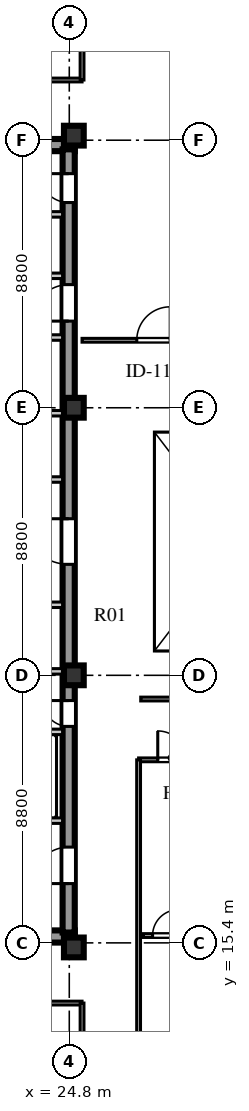
"""IFC4 building model, lengths in metres.
Left out: names, types, materials, properties, quantities, classifications, styles, units other than length and angle.
Written with IfcOpenShell. Run it as: python <this file> out.ifc"""

import sys

from ifc_helpers import new_model, si_unit, direction, frame, frame_2d, origin, origin_2d, place, context, subcontext, project, spatial, rectangle, extrude, element, fill, save


model = new_model("IFC4")
c1 = context("Model", 3, precision=1e-05, world=origin(), true_north=direction((0.0, 1.0)))
c2 = subcontext(c1, "Body", "Model", "MODEL_VIEW")
j1 = project(units=[si_unit("LENGTHUNIT", "METRE"), si_unit("PLANEANGLEUNIT", "RADIAN")], contexts=[c1])
p1 = place(None, origin())
s1 = spatial("IfcSite", under=j1, at=p1, CompositionType="ELEMENT")
p2 = place(p1, origin())
s2 = spatial("IfcBuilding", under=s1, at=p2, CompositionType="ELEMENT")
p3 = place(p2, frame((0.0, 0.0, 280.4)))
s3 = spatial("IfcBuildingStorey", under=s2, at=p3, CompositionType="ELEMENT", Elevation=280.4)
for number, where, z_axis, x_axis in (
    (1, (15.5, 15.61, 0.0), (0.0, 0.0, 1.0), (1.0, 0.0, 0.0)),
    (2, (15.5, 41.64, 0.0), (0.0, 0.0, 1.0), (1.0, 0.0, 0.0)),
):
    element("IfcWall", number, at=place(p3, frame(where, z_axis=z_axis, x_axis=x_axis)), inside=s3, PredefinedType="SHEAR", context=c2, shape_type="SweptSolid", body=[
        extrude(rectangle(XDim=9.48, YDim=0.4, at=frame_2d((4.74, 0.0))), origin(), (0.0, 0.0, 1.0), 3.66),
    ])
p4 = place(p3, frame((24.78, 15.74, 0.0), z_axis=(0.0, 0.0, 1.0), x_axis=(0.0, 1.0, 0.0)))
e3 = element("IfcWall", 3, at=p4, inside=s3, PredefinedType="SHEAR", context=c2, shape_type="SweptSolid", body=[
    extrude(rectangle(XDim=25.76, YDim=0.4, at=frame_2d((12.88, 0.0))), origin(), (0.0, 0.0, 1.0), 3.66),
])
p5 = place(p4, frame((1.61, 0.0, 0.0)))
e4 = element("IfcOpeningElement", 4, at=p5, cuts=e3, PredefinedType="OPENING", context=c2, shape_type="SweptSolid", body=[
    extrude(rectangle(XDim=1.2, YDim=2.1, at=frame_2d((0.6, 1.05))), frame((0.0, 0.21, 0.0), z_axis=(0.0, -1.0, 0.0), x_axis=(1.0, 0.0, 0.0)), (0.0, 0.0, 1.0), 0.42),
])
p6 = place(p4, frame((6.78, 0.0, 0.0)))
e5 = element("IfcOpeningElement", 5, at=p6, cuts=e3, PredefinedType="OPENING", context=c2, shape_type="SweptSolid", body=[
    extrude(rectangle(XDim=0.85, YDim=2.06, at=frame_2d((0.425, 1.03))), frame((0.0, 0.21, 0.0), z_axis=(0.0, -1.0, 0.0), x_axis=(1.0, 0.0, 0.0)), (0.0, 0.0, 1.0), 0.42),
])
p7 = place(p4, frame((12.11, 0.0, 0.0)))
e6 = element("IfcOpeningElement", 6, at=p7, cuts=e3, PredefinedType="OPENING", context=c2, shape_type="SweptSolid", body=[
    extrude(rectangle(XDim=1.5, YDim=2.12, at=frame_2d((0.75, 1.06))), frame((0.0, 0.21, 0.0), z_axis=(0.0, -1.0, 0.0), x_axis=(1.0, 0.0, 0.0)), (0.0, 0.0, 1.0), 0.42),
])
p8 = place(p4, frame((20.11, 0.0, 0.0)))
e7 = element("IfcOpeningElement", 7, at=p8, cuts=e3, PredefinedType="OPENING", context=c2, shape_type="SweptSolid", body=[
    extrude(rectangle(XDim=1.2, YDim=2.12, at=frame_2d((0.6, 1.06))), frame((0.0, 0.21, 0.0), z_axis=(0.0, -1.0, 0.0), x_axis=(1.0, 0.0, 0.0)), (0.0, 0.0, 1.0), 0.42),
])
p9 = place(p4, frame((24.01, 0.0, 0.0)))
e8 = element("IfcOpeningElement", 8, at=p9, cuts=e3, PredefinedType="OPENING", context=c2, shape_type="SweptSolid", body=[
    extrude(rectangle(XDim=0.95, YDim=2.1, at=frame_2d((0.475, 1.05))), frame((0.0, 0.21, 0.0), z_axis=(0.0, -1.0, 0.0), x_axis=(1.0, 0.0, 0.0)), (0.0, 0.0, 1.0), 0.42),
])
for number, where, z_axis, x_axis in (
    (9, (24.95, 15.25, 0.0), (0.0, 0.0, 1.0), (1.0, 0.0, 0.0)),
    (10, (24.95, 24.2, 0.0), (0.0, 0.0, 1.0), (1.0, 0.0, 0.0)),
    (11, (24.95, 33.0, 0.0), (0.0, 0.0, 1.0), (1.0, 0.0, 0.0)),
    (12, (24.95, 41.95, 0.0), (0.0, 0.0, 1.0), (1.0, 0.0, 0.0)),
):
    element("IfcColumn", number, at=place(p3, frame(where, z_axis=z_axis, x_axis=x_axis)), inside=s3, PredefinedType="COLUMN", context=c2, shape_type="SweptSolid", body=[
        extrude(rectangle(XDim=0.65, YDim=0.65, at=origin_2d()), origin(), (0.0, 0.0, 1.0), 3.66),
    ])
p10 = place(p3, frame((19.64, 19.42, 0.0), z_axis=(0.0, 0.0, 1.0), x_axis=(1.0, 0.0, 0.0)))
e13 = element("IfcWall", 13, at=p10, inside=s3, PredefinedType="SOLIDWALL", context=c2, shape_type="SweptSolid", body=[
    extrude(rectangle(XDim=4.94, YDim=0.18, at=frame_2d((2.47, 0.0))), origin(), (0.0, 0.0, 1.0), 3.66),
])
p11 = place(p10, frame((0.72, 0.0, 0.0)))
e14 = element("IfcOpeningElement", 14, at=p11, cuts=e13, PredefinedType="OPENING", context=c2, shape_type="SweptSolid", body=[
    extrude(rectangle(XDim=1.1, YDim=2.1, at=frame_2d((0.55, 1.05))), frame((0.0, 0.1, 0.0), z_axis=(0.0, -1.0, 0.0), x_axis=(1.0, 0.0, 0.0)), (0.0, 0.0, 1.0), 0.2),
])
p12 = place(p10, frame((3.02, 0.0, 0.0)))
e15 = element("IfcOpeningElement", 15, at=p12, cuts=e13, PredefinedType="OPENING", context=c2, shape_type="SweptSolid", body=[
    extrude(rectangle(XDim=1.1, YDim=2.1, at=frame_2d((0.55, 1.05))), frame((0.0, 0.1, 0.0), z_axis=(0.0, -1.0, 0.0), x_axis=(1.0, 0.0, 0.0)), (0.0, 0.0, 1.0), 0.2),
])
p13 = place(p3, frame((19.64, 22.34, 0.0), z_axis=(0.0, 0.0, 1.0), x_axis=(1.0, 0.0, 0.0)))
e16 = element("IfcWall", 16, at=p13, inside=s3, PredefinedType="SOLIDWALL", context=c2, shape_type="SweptSolid", body=[
    extrude(rectangle(XDim=4.94, YDim=0.18, at=frame_2d((2.47, 0.0))), origin(), (0.0, 0.0, 1.0), 3.66),
])
p14 = place(p3, frame((15.9, 26.52, 0.0), z_axis=(0.0, 0.0, 1.0), x_axis=(1.0, 0.0, 0.0)))
e17 = element("IfcWall", 17, at=p14, inside=s3, PredefinedType="SOLIDWALL", context=c2, shape_type="SweptSolid", body=[
    extrude(rectangle(XDim=8.68, YDim=0.18, at=frame_2d((4.34, 0.0))), origin(), (0.0, 0.0, 1.0), 3.66),
])
p15 = place(p14, frame((3.3, 0.0, 0.0)))
e18 = element("IfcOpeningElement", 18, at=p15, cuts=e17, PredefinedType="OPENING", context=c2, shape_type="SweptSolid", body=[
    extrude(rectangle(XDim=0.95, YDim=2.1, at=frame_2d((0.475, 1.05))), frame((0.0, 0.1, 0.0), z_axis=(0.0, -1.0, 0.0), x_axis=(1.0, 0.0, 0.0)), (0.0, 0.0, 1.0), 0.2),
])
p16 = place(p3, frame((15.9, 24.33, 0.0), z_axis=(0.0, 0.0, 1.0), x_axis=(1.0, 0.0, 0.0)))
e19 = element("IfcWall", 19, at=p16, inside=s3, PredefinedType="SOLIDWALL", context=c2, shape_type="SweptSolid", body=[
    extrude(rectangle(XDim=8.68, YDim=0.18, at=frame_2d((4.34, 0.0))), origin(), (0.0, 0.0, 1.0), 3.06),
])
p17 = place(p3, frame((15.9, 30.64, 0.0), z_axis=(0.0, 0.0, 1.0), x_axis=(1.0, 0.0, 0.0)))
e20 = element("IfcWall", 20, at=p17, inside=s3, PredefinedType="SOLIDWALL", context=c2, shape_type="SweptSolid", body=[
    extrude(rectangle(XDim=8.68, YDim=0.18, at=frame_2d((4.34, 0.0))), origin(), (0.0, 0.0, 1.0), 3.66),
])
p18 = place(p17, frame((3.7, 0.0, 0.0)))
e21 = element("IfcOpeningElement", 21, at=p18, cuts=e20, PredefinedType="OPENING", context=c2, shape_type="SweptSolid", body=[
    extrude(rectangle(XDim=0.95, YDim=2.1, at=frame_2d((0.475, 1.05))), frame((0.0, 0.1, 0.0), z_axis=(0.0, -1.0, 0.0), x_axis=(1.0, 0.0, 0.0)), (0.0, 0.0, 1.0), 0.2),
])
p19 = place(p3, frame((15.9, 32.82, 0.0), z_axis=(0.0, 0.0, 1.0), x_axis=(1.0, 0.0, 0.0)))
e22 = element("IfcWall", 22, at=p19, inside=s3, PredefinedType="SOLIDWALL", context=c2, shape_type="SweptSolid", body=[
    extrude(rectangle(XDim=8.68, YDim=0.18, at=frame_2d((4.34, 0.0))), origin(), (0.0, 0.0, 1.0), 3.06),
])
p20 = place(p3, frame((22.02, 35.31, 0.0), z_axis=(0.0, 0.0, 1.0), x_axis=(1.0, 0.0, 0.0)))
e23 = element("IfcWall", 23, at=p20, inside=s3, PredefinedType="SOLIDWALL", context=c2, shape_type="SweptSolid", body=[
    extrude(rectangle(XDim=2.56, YDim=0.18, at=frame_2d((1.28, 0.0))), origin(), (0.0, 0.0, 1.0), 3.66),
])
p21 = place(p20, frame((0.55, 0.0, 0.0)))
e24 = element("IfcOpeningElement", 24, at=p21, cuts=e23, PredefinedType="OPENING", context=c2, shape_type="SweptSolid", body=[
    extrude(rectangle(XDim=1.0, YDim=2.1, at=frame_2d((0.5, 1.05))), frame((0.0, 0.1, 0.0), z_axis=(0.0, -1.0, 0.0), x_axis=(1.0, 0.0, 0.0)), (0.0, 0.0, 1.0), 0.2),
])
p22 = place(p3, frame((19.64, 37.34, 0.0), z_axis=(0.0, 0.0, 1.0), x_axis=(1.0, 0.0, 0.0)))
e25 = element("IfcWall", 25, at=p22, inside=s3, PredefinedType="SOLIDWALL", context=c2, shape_type="SweptSolid", body=[
    extrude(rectangle(XDim=4.94, YDim=0.18, at=frame_2d((2.47, 0.0))), origin(), (0.0, 0.0, 1.0), 3.66),
])
p23 = place(p22, frame((0.45, 0.0, 0.0)))
e26 = element("IfcOpeningElement", 26, at=p23, cuts=e25, PredefinedType="OPENING", context=c2, shape_type="SweptSolid", body=[
    extrude(rectangle(XDim=1.0, YDim=2.1, at=frame_2d((0.5, 1.05))), frame((0.0, 0.1, 0.0), z_axis=(0.0, -1.0, 0.0), x_axis=(1.0, 0.0, 0.0)), (0.0, 0.0, 1.0), 0.2),
])
p24 = place(p22, frame((2.5, 0.0, 0.0)))
e27 = element("IfcOpeningElement", 27, at=p24, cuts=e25, PredefinedType="OPENING", context=c2, shape_type="SweptSolid", body=[
    extrude(rectangle(XDim=1.0, YDim=2.1, at=frame_2d((0.5, 1.05))), frame((0.0, 0.1, 0.0), z_axis=(0.0, -1.0, 0.0), x_axis=(1.0, 0.0, 0.0)), (0.0, 0.0, 1.0), 0.2),
])
p25 = place(p3, frame((19.64, 39.36, 0.0), z_axis=(0.0, 0.0, 1.0), x_axis=(1.0, 0.0, 0.0)))
e28 = element("IfcWall", 28, at=p25, inside=s3, PredefinedType="SOLIDWALL", context=c2, shape_type="SweptSolid", body=[
    extrude(rectangle(XDim=4.94, YDim=0.18, at=frame_2d((2.47, 0.0))), origin(), (0.0, 0.0, 1.0), 3.66),
])
p26 = place(p3, frame((27.08, 21.42, 0.0), z_axis=(0.0, 0.0, 1.0), x_axis=(1.0, 0.0, 0.0)))
e29 = element("IfcWall", 29, at=p26, inside=s3, PredefinedType="PLUMBINGWALL", context=c2, shape_type="SweptSolid", body=[
    extrude(rectangle(XDim=12.07, YDim=0.125, at=frame_2d((6.035, 0.0))), origin(), (0.0, 0.0, 1.0), 3.36),
])
p27 = place(p26, frame((0.63, 0.0, 0.0)))
e30 = element("IfcOpeningElement", 30, at=p27, cuts=e29, PredefinedType="OPENING", context=c2, shape_type="SweptSolid", body=[
    extrude(rectangle(XDim=0.95, YDim=2.1, at=frame_2d((0.475, 1.05))), frame((0.0, 0.073, 0.0), z_axis=(0.0, -1.0, 0.0), x_axis=(1.0, 0.0, 0.0)), (0.0, 0.0, 1.0), 0.145),
])
p28 = place(p3, frame((27.08, 10.38, 0.0), z_axis=(0.0, 0.0, 1.0), x_axis=(0.0, 1.0, 0.0)))
e31 = element("IfcWall", 31, at=p28, inside=s3, PredefinedType="PLUMBINGWALL", context=c2, shape_type="SweptSolid", body=[
    extrude(rectangle(XDim=11.04, YDim=0.125, at=frame_2d((5.52, 0.0))), origin(), (0.0, 0.0, 1.0), 3.66),
])
p29 = place(p3, frame((27.15, 23.42, 0.0), z_axis=(0.0, 0.0, 1.0), x_axis=(1.0, 0.0, 0.0)))
e32 = element("IfcWall", 32, at=p29, inside=s3, PredefinedType="PLUMBINGWALL", context=c2, shape_type="SweptSolid", body=[
    extrude(rectangle(XDim=6.0, YDim=0.125, at=frame_2d((3.0, 0.0))), origin(), (0.0, 0.0, 1.0), 3.66),
])
p30 = place(p3, frame((25.22, 35.22, 0.0), z_axis=(0.0, 0.0, 1.0), x_axis=(1.0, 0.0, 0.0)))
e33 = element("IfcWall", 33, at=p30, inside=s3, PredefinedType="PLUMBINGWALL", context=c2, shape_type="SweptSolid", body=[
    extrude(rectangle(XDim=9.5, YDim=0.125, at=frame_2d((4.75, 0.0))), origin(), (0.0, 0.0, 1.0), 3.66),
])
p31 = place(p30, frame((1.8, 0.0, 0.0)))
e34 = element("IfcOpeningElement", 34, at=p31, cuts=e33, PredefinedType="OPENING", context=c2, shape_type="SweptSolid", body=[
    extrude(rectangle(XDim=1.1, YDim=2.08, at=frame_2d((0.55, 1.04))), frame((0.0, 0.073, 0.0), z_axis=(0.0, -1.0, 0.0), x_axis=(1.0, 0.0, 0.0)), (0.0, 0.0, 1.0), 0.145),
])
p32 = place(p3, frame((13.8, 13.42, 0.0), z_axis=(0.0, 0.0, 1.0), x_axis=(1.0, 0.0, 0.0)))
e35 = element("IfcWall", 35, at=p32, inside=s3, PredefinedType="PLUMBINGWALL", context=c2, shape_type="SweptSolid", body=[
    extrude(rectangle(XDim=11.42, YDim=0.125, at=frame_2d((5.71, 0.0))), origin(), (0.0, 0.0, 1.0), 3.66),
])
p33 = place(p32, frame((3.2, 0.0, 0.0)))
e36 = element("IfcOpeningElement", 36, at=p33, cuts=e35, PredefinedType="OPENING", context=c2, shape_type="SweptSolid", body=[
    extrude(rectangle(XDim=0.95, YDim=2.08, at=frame_2d((0.475, 1.04))), frame((0.0, 0.073, 0.0), z_axis=(0.0, -1.0, 0.0), x_axis=(1.0, 0.0, 0.0)), (0.0, 0.0, 1.0), 0.145),
])
p34 = place(p3, frame((25.22, 10.38, 0.0), z_axis=(0.0, 0.0, 1.0), x_axis=(0.0, 1.0, 0.0)))
e37 = element("IfcWall", 37, at=p34, inside=s3, PredefinedType="PLUMBINGWALL", context=c2, shape_type="SweptSolid", body=[
    extrude(rectangle(XDim=3.04, YDim=0.125, at=frame_2d((1.52, 0.0))), origin(), (0.0, 0.0, 1.0), 3.21),
])
p35 = place(p3, frame((13.8, 43.78, 0.0), z_axis=(0.0, 0.0, 1.0), x_axis=(1.0, 0.0, 0.0)))
e38 = element("IfcWall", 38, at=p35, inside=s3, PredefinedType="PLUMBINGWALL", context=c2, shape_type="SweptSolid", body=[
    extrude(rectangle(XDim=11.42, YDim=0.125, at=frame_2d((5.71, 0.0))), origin(), (0.0, 0.0, 1.0), 3.66),
])
p36 = place(p35, frame((3.2, 0.0, 0.0)))
e39 = element("IfcOpeningElement", 39, at=p36, cuts=e38, PredefinedType="OPENING", context=c2, shape_type="SweptSolid", body=[
    extrude(rectangle(XDim=0.95, YDim=2.08, at=frame_2d((0.475, 1.04))), frame((0.0, 0.073, 0.0), z_axis=(0.0, -1.0, 0.0), x_axis=(1.0, 0.0, 0.0)), (0.0, 0.0, 1.0), 0.145),
])
p37 = place(p3, frame((25.22, 43.78, 0.0), z_axis=(0.0, 0.0, 1.0), x_axis=(0.0, 1.0, 0.0)))
e40 = element("IfcWall", 40, at=p37, inside=s3, PredefinedType="PLUMBINGWALL", context=c2, shape_type="SweptSolid", body=[
    extrude(rectangle(XDim=3.04, YDim=0.125, at=frame_2d((1.52, 0.0))), origin(), (0.0, 0.0, 1.0), 3.21),
])
p38 = place(p3, frame((27.24, 15.641, 0.0), z_axis=(0.0, 0.0, 1.0), x_axis=(1.0, 0.0, 0.0)))
e41 = element("IfcWall", 41, at=p38, inside=s3, PredefinedType="PLUMBINGWALL", context=c2, shape_type="SweptSolid", body=[
    extrude(rectangle(XDim=11.83, YDim=0.125, at=frame_2d((5.915, 0.0))), origin(), (0.0, 0.0, 1.0), 3.66),
])
p39 = place(p38, frame((0.3, 0.0, 0.0)))
e42 = element("IfcOpeningElement", 42, at=p39, cuts=e41, PredefinedType="OPENING", context=c2, shape_type="SweptSolid", body=[
    extrude(rectangle(XDim=0.85, YDim=2.08, at=frame_2d((0.425, 1.04))), frame((0.0, 0.073, 0.0), z_axis=(0.0, -1.0, 0.0), x_axis=(1.0, 0.0, 0.0)), (0.0, 0.0, 1.0), 0.145),
])
p40 = place(p38, frame((4.475, 0.0, 0.0)))
e43 = element("IfcOpeningElement", 43, at=p40, cuts=e41, PredefinedType="OPENING", context=c2, shape_type="SweptSolid", body=[
    extrude(rectangle(XDim=0.85, YDim=2.08, at=frame_2d((0.425, 1.04))), frame((0.0, 0.073, 0.0), z_axis=(0.0, -1.0, 0.0), x_axis=(1.0, 0.0, 0.0)), (0.0, 0.0, 1.0), 0.145),
])
p41 = place(p5, frame((1.2, 0.0, 0.0), z_axis=(0.0, 0.0, 1.0), x_axis=(-1.0, 0.0, 0.0)))
e44 = element("IfcDoor", 44, at=p41, inside=s3, OperationType="SINGLE_SWING_RIGHT", PredefinedType="DOOR", context=c2, shape_type="SweptSolid", body=[
    extrude(rectangle(XDim=1.2, YDim=2.1, at=frame_2d((0.6, 1.05))), frame((0.0, 0.025, 0.0), z_axis=(0.0, -1.0, 0.0), x_axis=(1.0, 0.0, 0.0)), (0.0, 0.0, 1.0), 0.05),
])
fill(e4, e44)
p42 = place(p6, frame((0.85, 0.0, 0.0), z_axis=(0.0, 0.0, 1.0), x_axis=(-1.0, 0.0, 0.0)))
e45 = element("IfcDoor", 45, at=p42, inside=s3, OperationType="SINGLE_SWING_LEFT", PredefinedType="DOOR", context=c2, shape_type="SweptSolid", body=[
    extrude(rectangle(XDim=0.85, YDim=2.06, at=frame_2d((0.425, 1.03))), frame((0.0, 0.025, 0.0), z_axis=(0.0, -1.0, 0.0), x_axis=(1.0, 0.0, 0.0)), (0.0, 0.0, 1.0), 0.05),
])
fill(e5, e45)
p43 = place(p7, frame((1.5, 0.0, 0.0), z_axis=(0.0, 0.0, 1.0), x_axis=(-1.0, 0.0, 0.0)))
e46 = element("IfcDoor", 46, at=p43, inside=s3, OperationType="SINGLE_SWING_LEFT", PredefinedType="DOOR", context=c2, shape_type="SweptSolid", body=[
    extrude(rectangle(XDim=1.5, YDim=2.12, at=frame_2d((0.75, 1.06))), frame((0.0, 0.025, 0.0), z_axis=(0.0, -1.0, 0.0), x_axis=(1.0, 0.0, 0.0)), (0.0, 0.0, 1.0), 0.05),
])
fill(e6, e46)
p44 = place(p8, frame((1.2, 0.0, 0.0), z_axis=(0.0, 0.0, 1.0), x_axis=(-1.0, 0.0, 0.0)))
e47 = element("IfcDoor", 47, at=p44, inside=s3, OperationType="SINGLE_SWING_RIGHT", PredefinedType="DOOR", context=c2, shape_type="SweptSolid", body=[
    extrude(rectangle(XDim=1.2, YDim=2.12, at=frame_2d((0.6, 1.06))), frame((0.0, 0.025, 0.0), z_axis=(0.0, -1.0, 0.0), x_axis=(1.0, 0.0, 0.0)), (0.0, 0.0, 1.0), 0.05),
])
fill(e7, e47)
p45 = place(p9, frame((0.95, 0.0, 0.0), z_axis=(0.0, 0.0, 1.0), x_axis=(-1.0, 0.0, 0.0)))
e48 = element("IfcDoor", 48, at=p45, inside=s3, OperationType="SINGLE_SWING_LEFT", PredefinedType="DOOR", context=c2, shape_type="SweptSolid", body=[
    extrude(rectangle(XDim=0.95, YDim=2.1, at=frame_2d((0.475, 1.05))), frame((0.0, 0.025, 0.0), z_axis=(0.0, -1.0, 0.0), x_axis=(1.0, 0.0, 0.0)), (0.0, 0.0, 1.0), 0.05),
])
fill(e8, e48)
p46 = place(p39, frame((0.85, 0.0, 0.0), z_axis=(0.0, 0.0, 1.0), x_axis=(-1.0, 0.0, 0.0)))
e49 = element("IfcDoor", 49, at=p46, inside=s3, OperationType="SINGLE_SWING_LEFT", PredefinedType="DOOR", context=c2, shape_type="SweptSolid", body=[
    extrude(rectangle(XDim=0.85, YDim=2.08, at=frame_2d((0.425, 1.04))), frame((0.0, 0.025, 0.0), z_axis=(0.0, -1.0, 0.0), x_axis=(1.0, 0.0, 0.0)), (0.0, 0.0, 1.0), 0.05),
])
fill(e42, e49)
p47 = place(p27, frame((0.95, 0.0, 0.0), z_axis=(0.0, 0.0, 1.0), x_axis=(-1.0, 0.0, 0.0)))
e50 = element("IfcDoor", 50, at=p47, inside=s3, OperationType="SINGLE_SWING_RIGHT", PredefinedType="DOOR", context=c2, shape_type="SweptSolid", body=[
    extrude(rectangle(XDim=0.95, YDim=2.1, at=frame_2d((0.475, 1.05))), frame((0.0, 0.025, 0.0), z_axis=(0.0, -1.0, 0.0), x_axis=(1.0, 0.0, 0.0)), (0.0, 0.0, 1.0), 0.05),
])
fill(e30, e50)
p48 = place(p31, origin())
e51 = element("IfcDoor", 51, at=p48, inside=s3, OperationType="SINGLE_SWING_RIGHT", PredefinedType="DOOR", context=c2, shape_type="SweptSolid", body=[
    extrude(rectangle(XDim=1.1, YDim=2.08, at=frame_2d((0.55, 1.04))), frame((0.0, 0.025, 0.0), z_axis=(0.0, -1.0, 0.0), x_axis=(1.0, 0.0, 0.0)), (0.0, 0.0, 1.0), 0.05),
])
fill(e34, e51)
save(model, sys.argv[1])
